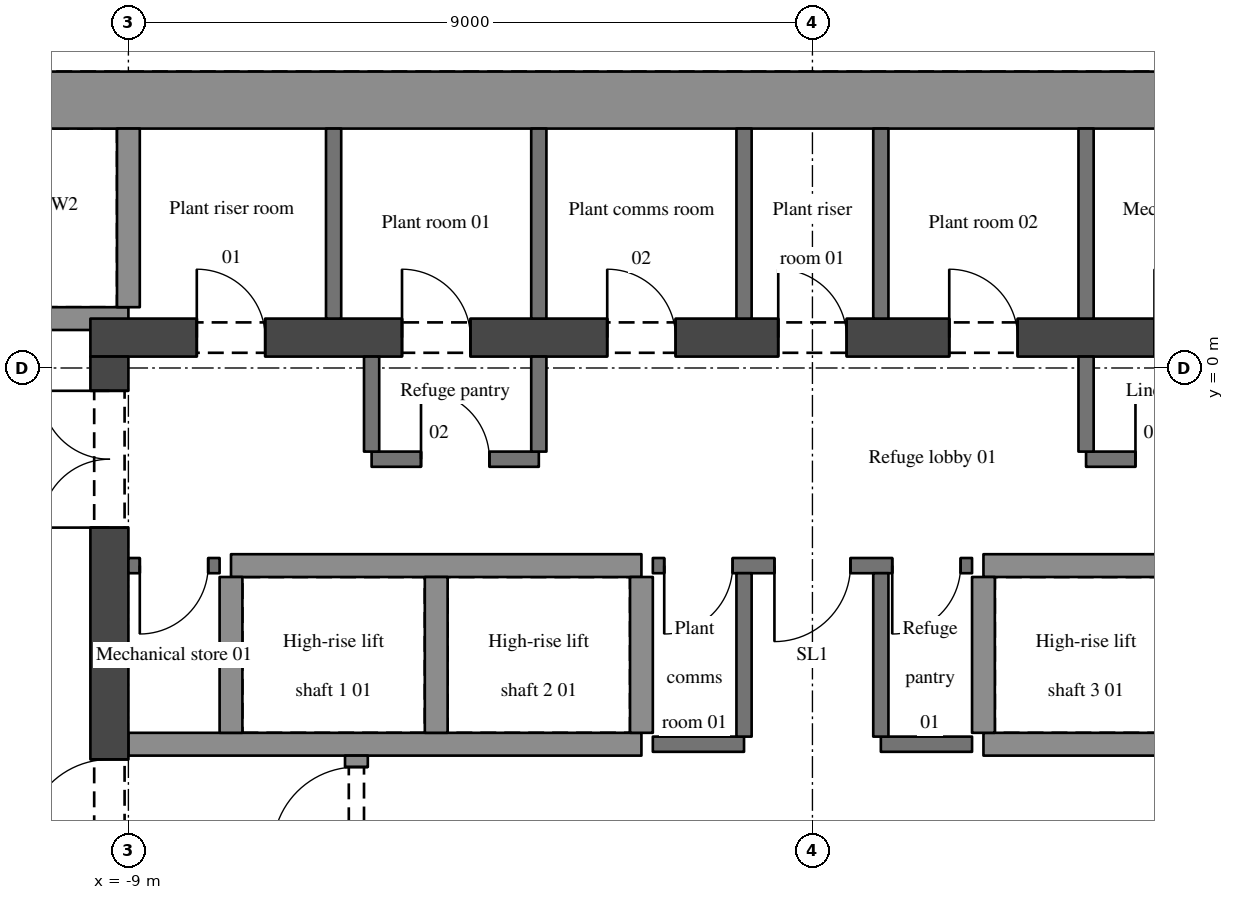
"""IFC4 building model, lengths in metres.
Left out: names, types, materials, properties, quantities, classifications, styles, units other than length and angle.
Written with IfcOpenShell. Run it as: python <this file> out.ifc"""

import sys

from ifc_helpers import new_model, si_unit, direction, frame, frame_2d, origin, place, context, subcontext, project, spatial, rectangle, extrude, element, fill, save


model = new_model("IFC4")
c1 = context("Model", 3, precision=1e-05, world=origin(), true_north=direction((0.0, 1.0)))
c2 = subcontext(c1, "Body", "Model", "MODEL_VIEW")
j1 = project(units=[si_unit("LENGTHUNIT", "METRE"), si_unit("PLANEANGLEUNIT", "RADIAN")], contexts=[c1])
p1 = place(None, origin())
s1 = spatial("IfcSite", under=j1, at=p1, CompositionType="ELEMENT")
p2 = place(p1, origin())
s2 = spatial("IfcBuilding", under=s1, at=p2, CompositionType="ELEMENT")
p3 = place(p2, frame((0.0, 0.0, 167.7)))
s3 = spatial("IfcBuildingStorey", under=s2, at=p3, CompositionType="ELEMENT", Elevation=167.7)
p4 = place(p3, frame((-13.0, 3.525, 0.0), z_axis=(0.0, 0.0, 1.0), x_axis=(1.0, 0.0, 0.0)))
e1 = element("IfcWall", 1, at=p4, inside=s3, PredefinedType="SHEAR", context=c2, shape_type="SweptSolid", body=[
    extrude(rectangle(XDim=26.0, YDim=0.75, at=frame_2d((13.0, 0.0))), origin(), (0.0, 0.0, 1.0), 4.5),
])
p5 = place(p3, frame((-9.5, 0.4, 0.0), z_axis=(0.0, 0.0, 1.0), x_axis=(1.0, 0.0, 0.0)))
e2 = element("IfcWall", 2, at=p5, inside=s3, PredefinedType="SHEAR", context=c2, shape_type="SweptSolid", body=[
    extrude(rectangle(XDim=19.0, YDim=0.5, at=frame_2d((9.5, 0.0))), origin(), (0.0, 0.0, 1.0), 4.5),
])
p6 = place(p5, frame((1.4, 0.0, 0.0)))
e3 = element("IfcOpeningElement", 3, at=p6, cuts=e2, PredefinedType="OPENING", context=c2, shape_type="SweptSolid", body=[
    extrude(rectangle(XDim=0.9, YDim=2.1, at=frame_2d((0.45, 1.05))), frame((0.0, 0.26, 0.0), z_axis=(0.0, -1.0, 0.0), x_axis=(1.0, 0.0, 0.0)), (0.0, 0.0, 1.0), 0.52),
])
p7 = place(p5, frame((4.1, 0.0, 0.0)))
e4 = element("IfcOpeningElement", 4, at=p7, cuts=e2, PredefinedType="OPENING", context=c2, shape_type="SweptSolid", body=[
    extrude(rectangle(XDim=0.9, YDim=2.1, at=frame_2d((0.45, 1.05))), frame((0.0, 0.26, 0.0), z_axis=(0.0, -1.0, 0.0), x_axis=(1.0, 0.0, 0.0)), (0.0, 0.0, 1.0), 0.52),
])
p8 = place(p5, frame((6.8, 0.0, 0.0)))
e5 = element("IfcOpeningElement", 5, at=p8, cuts=e2, PredefinedType="OPENING", context=c2, shape_type="SweptSolid", body=[
    extrude(rectangle(XDim=0.9, YDim=2.1, at=frame_2d((0.45, 1.05))), frame((0.0, 0.26, 0.0), z_axis=(0.0, -1.0, 0.0), x_axis=(1.0, 0.0, 0.0)), (0.0, 0.0, 1.0), 0.52),
])
p9 = place(p5, frame((11.3, 0.0, 0.0)))
e6 = element("IfcOpeningElement", 6, at=p9, cuts=e2, PredefinedType="OPENING", context=c2, shape_type="SweptSolid", body=[
    extrude(rectangle(XDim=0.9, YDim=2.1, at=frame_2d((0.45, 1.05))), frame((0.0, 0.26, 0.0), z_axis=(0.0, -1.0, 0.0), x_axis=(1.0, 0.0, 0.0)), (0.0, 0.0, 1.0), 0.52),
])
p10 = place(p5, frame((14.0, 0.0, 0.0)))
e7 = element("IfcOpeningElement", 7, at=p10, cuts=e2, PredefinedType="OPENING", context=c2, shape_type="SweptSolid", body=[
    extrude(rectangle(XDim=0.9, YDim=2.1, at=frame_2d((0.45, 1.05))), frame((0.0, 0.26, 0.0), z_axis=(0.0, -1.0, 0.0), x_axis=(1.0, 0.0, 0.0)), (0.0, 0.0, 1.0), 0.52),
])
p11 = place(p5, frame((16.7, 0.0, 0.0)))
e8 = element("IfcOpeningElement", 8, at=p11, cuts=e2, PredefinedType="OPENING", context=c2, shape_type="SweptSolid", body=[
    extrude(rectangle(XDim=0.9, YDim=2.1, at=frame_2d((0.45, 1.05))), frame((0.0, 0.26, 0.0), z_axis=(0.0, -1.0, 0.0), x_axis=(1.0, 0.0, 0.0)), (0.0, 0.0, 1.0), 0.52),
])
p12 = place(p5, frame((9.05, 0.0, 0.0)))
e9 = element("IfcOpeningElement", 9, at=p12, cuts=e2, PredefinedType="OPENING", context=c2, shape_type="SweptSolid", body=[
    extrude(rectangle(XDim=0.9, YDim=2.1, at=frame_2d((0.45, 1.05))), frame((0.0, 0.26, 0.0), z_axis=(0.0, -1.0, 0.0), x_axis=(1.0, 0.0, 0.0)), (0.0, 0.0, 1.0), 0.52),
])
p13 = place(p3, frame((-9.25, -11.5, 0.0), z_axis=(0.0, 0.0, 1.0), x_axis=(0.0, 1.0, 0.0)))
e10 = element("IfcWall", 10, at=p13, inside=s3, PredefinedType="SHEAR", context=c2, shape_type="SweptSolid", body=[
    extrude(rectangle(XDim=11.65, YDim=0.5, at=frame_2d((5.825, 0.0))), origin(), (0.0, 0.0, 1.0), 4.5),
])
p14 = place(p13, frame((9.4, 0.0, 0.0)))
e11 = element("IfcOpeningElement", 11, at=p14, cuts=e10, PredefinedType="OPENING", context=c2, shape_type="SweptSolid", body=[
    extrude(rectangle(XDim=1.8, YDim=2.1, at=frame_2d((0.9, 1.05))), frame((0.0, 0.26, 0.0), z_axis=(0.0, -1.0, 0.0), x_axis=(1.0, 0.0, 0.0)), (0.0, 0.0, 1.0), 0.52),
])
p15 = place(p13, frame((5.25, 0.0, 0.0)))
e12 = element("IfcOpeningElement", 12, at=p15, cuts=e10, PredefinedType="OPENING", context=c2, shape_type="SweptSolid", body=[
    extrude(rectangle(XDim=1.1, YDim=2.1, at=frame_2d((0.55, 1.05))), frame((0.0, 0.26, 0.0), z_axis=(0.0, -1.0, 0.0), x_axis=(1.0, 0.0, 0.0)), (0.0, 0.0, 1.0), 0.52),
])
p16 = place(p3, frame((-9.0, -4.95, 0.0), z_axis=(0.0, 0.0, 1.0), x_axis=(1.0, 0.0, 0.0)))
e13 = element("IfcWall", 13, at=p16, inside=s3, PredefinedType="SHEAR", context=c2, shape_type="SweptSolid", body=[
    extrude(rectangle(XDim=6.75, YDim=0.3, at=frame_2d((3.375, 0.0))), origin(), (0.0, 0.0, 1.0), 4.5),
])
for number, where, z_axis, x_axis in (
    (14, (-2.1, -4.95, 0.0), (0.0, 0.0, 1.0), (1.0, 0.0, 0.0)),
    (15, (0.9, -4.95, 0.0), (0.0, 0.0, 1.0), (1.0, 0.0, 0.0)),
):
    element("IfcWall", number, at=place(p3, frame(where, z_axis=z_axis, x_axis=x_axis)), inside=s3, PredefinedType="SOLIDWALL", context=c2, shape_type="SweptSolid", body=[
        extrude(rectangle(XDim=1.2, YDim=0.2, at=frame_2d((0.6, 0.0))), origin(), (0.0, 0.0, 1.0), 4.2),
    ])
p17 = place(p3, frame((2.25, -4.95, 0.0), z_axis=(0.0, 0.0, 1.0), x_axis=(1.0, 0.0, 0.0)))
e16 = element("IfcWall", 16, at=p17, inside=s3, PredefinedType="SHEAR", context=c2, shape_type="SweptSolid", body=[
    extrude(rectangle(XDim=6.75, YDim=0.3, at=frame_2d((3.375, 0.0))), origin(), (0.0, 0.0, 1.0), 4.5),
])
p18 = place(p3, frame((-7.8, -2.6, 0.0), z_axis=(0.0, 0.0, 1.0), x_axis=(-1.0, 0.0, 0.0)))
e17 = element("IfcWall", 17, at=p18, inside=s3, PredefinedType="SOLIDWALL", context=c2, shape_type="SweptSolid", body=[
    extrude(rectangle(XDim=1.2, YDim=0.2, at=frame_2d((0.6, 0.0))), origin(), (0.0, 0.0, 1.0), 4.2),
])
p19 = place(p18, frame((0.15, 0.0, 0.0)))
e18 = element("IfcOpeningElement", 18, at=p19, cuts=e17, PredefinedType="OPENING", context=c2, shape_type="SweptSolid", body=[
    extrude(rectangle(XDim=0.9, YDim=2.1, at=frame_2d((0.45, 1.05))), frame((0.0, 0.11, 0.0), z_axis=(0.0, -1.0, 0.0), x_axis=(1.0, 0.0, 0.0)), (0.0, 0.0, 1.0), 0.22),
])
p20 = place(p3, frame((-7.65, -2.6, 0.0), z_axis=(0.0, 0.0, 1.0), x_axis=(1.0, 0.0, 0.0)))
e19 = element("IfcWall", 19, at=p20, inside=s3, PredefinedType="SHEAR", context=c2, shape_type="SweptSolid", body=[
    extrude(rectangle(XDim=5.4, YDim=0.3, at=frame_2d((2.7, 0.0))), origin(), (0.0, 0.0, 1.0), 4.5),
])
p21 = place(p3, frame((2.1, -2.6, 0.0), z_axis=(0.0, 0.0, 1.0), x_axis=(-1.0, 0.0, 0.0)))
e20 = element("IfcWall", 20, at=p21, inside=s3, PredefinedType="SOLIDWALL", context=c2, shape_type="SweptSolid", body=[
    extrude(rectangle(XDim=4.2, YDim=0.2, at=frame_2d((2.1, 0.0))), origin(), (0.0, 0.0, 1.0), 4.2),
])
p22 = place(p21, frame((1.6, 0.0, 0.0)))
e21 = element("IfcOpeningElement", 21, at=p22, cuts=e20, PredefinedType="OPENING", context=c2, shape_type="SweptSolid", body=[
    extrude(rectangle(XDim=1.0, YDim=2.1, at=frame_2d((0.5, 1.05))), frame((0.0, 0.11, 0.0), z_axis=(0.0, -1.0, 0.0), x_axis=(1.0, 0.0, 0.0)), (0.0, 0.0, 1.0), 0.22),
])
p23 = place(p21, frame((3.15, 0.0, 0.0)))
e22 = element("IfcOpeningElement", 22, at=p23, cuts=e20, PredefinedType="OPENING", context=c2, shape_type="SweptSolid", body=[
    extrude(rectangle(XDim=0.9, YDim=2.1, at=frame_2d((0.45, 1.05))), frame((0.0, 0.11, 0.0), z_axis=(0.0, -1.0, 0.0), x_axis=(1.0, 0.0, 0.0)), (0.0, 0.0, 1.0), 0.22),
])
p24 = place(p21, frame((0.15, 0.0, 0.0)))
e23 = element("IfcOpeningElement", 23, at=p24, cuts=e20, PredefinedType="OPENING", context=c2, shape_type="SweptSolid", body=[
    extrude(rectangle(XDim=0.9, YDim=2.1, at=frame_2d((0.45, 1.05))), frame((0.0, 0.11, 0.0), z_axis=(0.0, -1.0, 0.0), x_axis=(1.0, 0.0, 0.0)), (0.0, 0.0, 1.0), 0.22),
])
p25 = place(p3, frame((2.25, -2.6, 0.0), z_axis=(0.0, 0.0, 1.0), x_axis=(1.0, 0.0, 0.0)))
e24 = element("IfcWall", 24, at=p25, inside=s3, PredefinedType="SHEAR", context=c2, shape_type="SweptSolid", body=[
    extrude(rectangle(XDim=5.4, YDim=0.3, at=frame_2d((2.7, 0.0))), origin(), (0.0, 0.0, 1.0), 4.5),
])
p26 = place(p3, frame((-5.8, -1.2, 0.0), z_axis=(0.0, 0.0, 1.0), x_axis=(1.0, 0.0, 0.0)))
e25 = element("IfcWall", 25, at=p26, inside=s3, PredefinedType="SOLIDWALL", context=c2, shape_type="SweptSolid", body=[
    extrude(rectangle(XDim=2.2, YDim=0.2, at=frame_2d((1.1, 0.0))), origin(), (0.0, 0.0, 1.0), 4.2),
])
p27 = place(p26, frame((0.65, 0.0, 0.0)))
e26 = element("IfcOpeningElement", 26, at=p27, cuts=e25, PredefinedType="OPENING", context=c2, shape_type="SweptSolid", body=[
    extrude(rectangle(XDim=0.9, YDim=2.1, at=frame_2d((0.45, 1.05))), frame((0.0, 0.11, 0.0), z_axis=(0.0, -1.0, 0.0), x_axis=(1.0, 0.0, 0.0)), (0.0, 0.0, 1.0), 0.22),
])
p28 = place(p3, frame((3.6, -1.2, 0.0), z_axis=(0.0, 0.0, 1.0), x_axis=(1.0, 0.0, 0.0)))
e27 = element("IfcWall", 27, at=p28, inside=s3, PredefinedType="SOLIDWALL", context=c2, shape_type="SweptSolid", body=[
    extrude(rectangle(XDim=2.2, YDim=0.2, at=frame_2d((1.1, 0.0))), origin(), (0.0, 0.0, 1.0), 4.2),
])
p29 = place(p28, frame((0.65, 0.0, 0.0)))
e28 = element("IfcOpeningElement", 28, at=p29, cuts=e27, PredefinedType="OPENING", context=c2, shape_type="SweptSolid", body=[
    extrude(rectangle(XDim=0.9, YDim=2.1, at=frame_2d((0.45, 1.05))), frame((0.0, 0.11, 0.0), z_axis=(0.0, -1.0, 0.0), x_axis=(1.0, 0.0, 0.0)), (0.0, 0.0, 1.0), 0.22),
])
p30 = place(p3, frame((-9.0, 0.65, 0.0), z_axis=(0.0, 0.0, 1.0), x_axis=(-1.0, 0.0, 0.0)))
e29 = element("IfcWall", 29, at=p30, inside=s3, PredefinedType="SHEAR", context=c2, shape_type="SweptSolid", body=[
    extrude(rectangle(XDim=3.25, YDim=0.3, at=frame_2d((1.625, 0.0))), origin(), (0.0, 0.0, 1.0), 4.5),
])
p31 = place(p3, frame((-9.0, 0.8, 0.0), z_axis=(0.0, 0.0, 1.0), x_axis=(0.0, 1.0, 0.0)))
e30 = element("IfcWall", 30, at=p31, inside=s3, PredefinedType="SHEAR", context=c2, shape_type="SweptSolid", body=[
    extrude(rectangle(XDim=2.35, YDim=0.3, at=frame_2d((1.175, 0.0))), origin(), (0.0, 0.0, 1.0), 4.5),
])
p32 = place(p3, frame((-7.65, -4.8, 0.0), z_axis=(0.0, 0.0, 1.0), x_axis=(0.0, 1.0, 0.0)))
e31 = element("IfcWall", 31, at=p32, inside=s3, PredefinedType="SHEAR", context=c2, shape_type="SweptSolid", body=[
    extrude(rectangle(XDim=2.05, YDim=0.3, at=frame_2d((1.025, 0.0))), origin(), (0.0, 0.0, 1.0), 4.5),
])
p33 = place(p3, frame((-6.3, 0.65, 0.0), z_axis=(0.0, 0.0, 1.0), x_axis=(0.0, 1.0, 0.0)))
e32 = element("IfcWall", 32, at=p33, inside=s3, PredefinedType="SOLIDWALL", context=c2, shape_type="SweptSolid", body=[
    extrude(rectangle(XDim=2.5, YDim=0.2, at=frame_2d((1.25, 0.0))), origin(), (0.0, 0.0, 1.0), 4.2),
])
p34 = place(p3, frame((-6.0, -11.5, 0.0), z_axis=(0.0, 0.0, 1.0), x_axis=(0.0, 1.0, 0.0)))
e33 = element("IfcWall", 33, at=p34, inside=s3, PredefinedType="SHEAR", context=c2, shape_type="SweptSolid", body=[
    extrude(rectangle(XDim=6.4, YDim=0.3, at=frame_2d((3.2, 0.0))), origin(), (0.0, 0.0, 1.0), 4.5),
])
p35 = place(p34, frame((5.15, 0.0, 0.0)))
e34 = element("IfcOpeningElement", 34, at=p35, cuts=e33, PredefinedType="OPENING", context=c2, shape_type="SweptSolid", body=[
    extrude(rectangle(XDim=1.1, YDim=2.1, at=frame_2d((0.55, 1.05))), frame((0.0, 0.16, 0.0), z_axis=(0.0, -1.0, 0.0), x_axis=(1.0, 0.0, 0.0)), (0.0, 0.0, 1.0), 0.32),
])
p36 = place(p3, frame((-5.8, -1.1, 0.0), z_axis=(0.0, 0.0, 1.0), x_axis=(0.0, 1.0, 0.0)))
e35 = element("IfcWall", 35, at=p36, inside=s3, PredefinedType="SOLIDWALL", context=c2, shape_type="SweptSolid", body=[
    extrude(rectangle(XDim=1.25, YDim=0.2, at=frame_2d((0.625, 0.0))), origin(), (0.0, 0.0, 1.0), 4.2),
])
p37 = place(p3, frame((-4.95, -4.8, 0.0), z_axis=(0.0, 0.0, 1.0), x_axis=(0.0, 1.0, 0.0)))
e36 = element("IfcWall", 36, at=p37, inside=s3, PredefinedType="SHEAR", context=c2, shape_type="SweptSolid", body=[
    extrude(rectangle(XDim=2.05, YDim=0.3, at=frame_2d((1.025, 0.0))), origin(), (0.0, 0.0, 1.0), 4.5),
])
p38 = place(p3, frame((-3.6, -1.1, 0.0), z_axis=(0.0, 0.0, 1.0), x_axis=(0.0, 1.0, 0.0)))
e37 = element("IfcWall", 37, at=p38, inside=s3, PredefinedType="SOLIDWALL", context=c2, shape_type="SweptSolid", body=[
    extrude(rectangle(XDim=1.25, YDim=0.2, at=frame_2d((0.625, 0.0))), origin(), (0.0, 0.0, 1.0), 4.2),
])
p39 = place(p3, frame((-3.6, 0.65, 0.0), z_axis=(0.0, 0.0, 1.0), x_axis=(0.0, 1.0, 0.0)))
e38 = element("IfcWall", 38, at=p39, inside=s3, PredefinedType="SOLIDWALL", context=c2, shape_type="SweptSolid", body=[
    extrude(rectangle(XDim=2.5, YDim=0.2, at=frame_2d((1.25, 0.0))), origin(), (0.0, 0.0, 1.0), 4.2),
])
p40 = place(p3, frame((-2.25, -4.8, 0.0), z_axis=(0.0, 0.0, 1.0), x_axis=(0.0, 1.0, 0.0)))
e39 = element("IfcWall", 39, at=p40, inside=s3, PredefinedType="SHEAR", context=c2, shape_type="SweptSolid", body=[
    extrude(rectangle(XDim=2.05, YDim=0.3, at=frame_2d((1.025, 0.0))), origin(), (0.0, 0.0, 1.0), 4.5),
])
p41 = place(p3, frame((-0.9, -4.85, 0.0), z_axis=(0.0, 0.0, 1.0), x_axis=(0.0, 1.0, 0.0)))
e40 = element("IfcWall", 40, at=p41, inside=s3, PredefinedType="SOLIDWALL", context=c2, shape_type="SweptSolid", body=[
    extrude(rectangle(XDim=2.15, YDim=0.2, at=frame_2d((1.075, 0.0))), origin(), (0.0, 0.0, 1.0), 4.2),
])
p42 = place(p3, frame((-0.9, 0.65, 0.0), z_axis=(0.0, 0.0, 1.0), x_axis=(0.0, 1.0, 0.0)))
e41 = element("IfcWall", 41, at=p42, inside=s3, PredefinedType="SOLIDWALL", context=c2, shape_type="SweptSolid", body=[
    extrude(rectangle(XDim=2.5, YDim=0.2, at=frame_2d((1.25, 0.0))), origin(), (0.0, 0.0, 1.0), 4.2),
])
p43 = place(p3, frame((0.9, -4.85, 0.0), z_axis=(0.0, 0.0, 1.0), x_axis=(0.0, 1.0, 0.0)))
e42 = element("IfcWall", 42, at=p43, inside=s3, PredefinedType="SOLIDWALL", context=c2, shape_type="SweptSolid", body=[
    extrude(rectangle(XDim=2.15, YDim=0.2, at=frame_2d((1.075, 0.0))), origin(), (0.0, 0.0, 1.0), 4.2),
])
p44 = place(p3, frame((0.9, 0.65, 0.0), z_axis=(0.0, 0.0, 1.0), x_axis=(0.0, 1.0, 0.0)))
e43 = element("IfcWall", 43, at=p44, inside=s3, PredefinedType="SOLIDWALL", context=c2, shape_type="SweptSolid", body=[
    extrude(rectangle(XDim=2.5, YDim=0.2, at=frame_2d((1.25, 0.0))), origin(), (0.0, 0.0, 1.0), 4.2),
])
p45 = place(p3, frame((2.25, -4.8, 0.0), z_axis=(0.0, 0.0, 1.0), x_axis=(0.0, 1.0, 0.0)))
e44 = element("IfcWall", 44, at=p45, inside=s3, PredefinedType="SHEAR", context=c2, shape_type="SweptSolid", body=[
    extrude(rectangle(XDim=2.05, YDim=0.3, at=frame_2d((1.025, 0.0))), origin(), (0.0, 0.0, 1.0), 4.5),
])
p46 = place(p3, frame((3.6, -1.1, 0.0), z_axis=(0.0, 0.0, 1.0), x_axis=(0.0, 1.0, 0.0)))
e45 = element("IfcWall", 45, at=p46, inside=s3, PredefinedType="SOLIDWALL", context=c2, shape_type="SweptSolid", body=[
    extrude(rectangle(XDim=1.25, YDim=0.2, at=frame_2d((0.625, 0.0))), origin(), (0.0, 0.0, 1.0), 4.2),
])
p47 = place(p3, frame((3.6, 0.65, 0.0), z_axis=(0.0, 0.0, 1.0), x_axis=(0.0, 1.0, 0.0)))
e46 = element("IfcWall", 46, at=p47, inside=s3, PredefinedType="SOLIDWALL", context=c2, shape_type="SweptSolid", body=[
    extrude(rectangle(XDim=2.5, YDim=0.2, at=frame_2d((1.25, 0.0))), origin(), (0.0, 0.0, 1.0), 4.2),
])
p48 = place(p14, origin())
e47 = element("IfcDoor", 47, at=p48, inside=s3, OperationType="DOUBLE_DOOR_SINGLE_SWING", PredefinedType="DOOR", context=c2, shape_type="SweptSolid", body=[
    extrude(rectangle(XDim=1.8, YDim=2.1, at=frame_2d((0.9, 1.05))), frame((0.0, 0.025, 0.0), z_axis=(0.0, -1.0, 0.0), x_axis=(1.0, 0.0, 0.0)), (0.0, 0.0, 1.0), 0.05),
])
fill(e11, e47)
p49 = place(p22, origin())
e48 = element("IfcDoor", 48, at=p49, inside=s3, OperationType="SINGLE_SWING_RIGHT", PredefinedType="DOOR", context=c2, shape_type="SweptSolid", body=[
    extrude(rectangle(XDim=1.0, YDim=2.1, at=frame_2d((0.5, 1.05))), frame((0.0, 0.025, 0.0), z_axis=(0.0, -1.0, 0.0), x_axis=(1.0, 0.0, 0.0)), (0.0, 0.0, 1.0), 0.05),
])
fill(e21, e48)
p50 = place(p35, origin())
e49 = element("IfcDoor", 49, at=p50, inside=s3, OperationType="SINGLE_SWING_LEFT", PredefinedType="DOOR", context=c2, shape_type="SweptSolid", body=[
    extrude(rectangle(XDim=1.1, YDim=2.1, at=frame_2d((0.55, 1.05))), frame((0.0, 0.025, 0.0), z_axis=(0.0, -1.0, 0.0), x_axis=(1.0, 0.0, 0.0)), (0.0, 0.0, 1.0), 0.05),
])
fill(e34, e49)
p51 = place(p15, origin())
e50 = element("IfcDoor", 50, at=p51, inside=s3, OperationType="SINGLE_SWING_LEFT", PredefinedType="DOOR", context=c2, shape_type="SweptSolid", body=[
    extrude(rectangle(XDim=1.1, YDim=2.1, at=frame_2d((0.55, 1.05))), frame((0.0, 0.025, 0.0), z_axis=(0.0, -1.0, 0.0), x_axis=(1.0, 0.0, 0.0)), (0.0, 0.0, 1.0), 0.05),
])
fill(e12, e50)
p52 = place(p23, origin())
e51 = element("IfcDoor", 51, at=p52, inside=s3, OperationType="SINGLE_SWING_RIGHT", PredefinedType="DOOR", context=c2, shape_type="SweptSolid", body=[
    extrude(rectangle(XDim=0.9, YDim=2.1, at=frame_2d((0.45, 1.05))), frame((0.0, 0.025, 0.0), z_axis=(0.0, -1.0, 0.0), x_axis=(1.0, 0.0, 0.0)), (0.0, 0.0, 1.0), 0.05),
])
fill(e22, e51)
p53 = place(p24, origin())
e52 = element("IfcDoor", 52, at=p53, inside=s3, OperationType="SINGLE_SWING_RIGHT", PredefinedType="DOOR", context=c2, shape_type="SweptSolid", body=[
    extrude(rectangle(XDim=0.9, YDim=2.1, at=frame_2d((0.45, 1.05))), frame((0.0, 0.025, 0.0), z_axis=(0.0, -1.0, 0.0), x_axis=(1.0, 0.0, 0.0)), (0.0, 0.0, 1.0), 0.05),
])
fill(e23, e52)
p54 = place(p19, origin())
e53 = element("IfcDoor", 53, at=p54, inside=s3, OperationType="SINGLE_SWING_RIGHT", PredefinedType="DOOR", context=c2, shape_type="SweptSolid", body=[
    extrude(rectangle(XDim=0.9, YDim=2.1, at=frame_2d((0.45, 1.05))), frame((0.0, 0.025, 0.0), z_axis=(0.0, -1.0, 0.0), x_axis=(1.0, 0.0, 0.0)), (0.0, 0.0, 1.0), 0.05),
])
fill(e18, e53)
p55 = place(p6, origin())
e54 = element("IfcDoor", 54, at=p55, inside=s3, OperationType="SINGLE_SWING_LEFT", PredefinedType="DOOR", context=c2, shape_type="SweptSolid", body=[
    extrude(rectangle(XDim=0.9, YDim=2.1, at=frame_2d((0.45, 1.05))), frame((0.0, 0.025, 0.0), z_axis=(0.0, -1.0, 0.0), x_axis=(1.0, 0.0, 0.0)), (0.0, 0.0, 1.0), 0.05),
])
fill(e3, e54)
p56 = place(p7, origin())
e55 = element("IfcDoor", 55, at=p56, inside=s3, OperationType="SINGLE_SWING_LEFT", PredefinedType="DOOR", context=c2, shape_type="SweptSolid", body=[
    extrude(rectangle(XDim=0.9, YDim=2.1, at=frame_2d((0.45, 1.05))), frame((0.0, 0.025, 0.0), z_axis=(0.0, -1.0, 0.0), x_axis=(1.0, 0.0, 0.0)), (0.0, 0.0, 1.0), 0.05),
])
fill(e4, e55)
p57 = place(p8, origin())
e56 = element("IfcDoor", 56, at=p57, inside=s3, OperationType="SINGLE_SWING_LEFT", PredefinedType="DOOR", context=c2, shape_type="SweptSolid", body=[
    extrude(rectangle(XDim=0.9, YDim=2.1, at=frame_2d((0.45, 1.05))), frame((0.0, 0.025, 0.0), z_axis=(0.0, -1.0, 0.0), x_axis=(1.0, 0.0, 0.0)), (0.0, 0.0, 1.0), 0.05),
])
fill(e5, e56)
p58 = place(p9, origin())
e57 = element("IfcDoor", 57, at=p58, inside=s3, OperationType="SINGLE_SWING_LEFT", PredefinedType="DOOR", context=c2, shape_type="SweptSolid", body=[
    extrude(rectangle(XDim=0.9, YDim=2.1, at=frame_2d((0.45, 1.05))), frame((0.0, 0.025, 0.0), z_axis=(0.0, -1.0, 0.0), x_axis=(1.0, 0.0, 0.0)), (0.0, 0.0, 1.0), 0.05),
])
fill(e6, e57)
p59 = place(p12, origin())
e58 = element("IfcDoor", 58, at=p59, inside=s3, OperationType="SINGLE_SWING_LEFT", PredefinedType="DOOR", context=c2, shape_type="SweptSolid", body=[
    extrude(rectangle(XDim=0.9, YDim=2.1, at=frame_2d((0.45, 1.05))), frame((0.0, 0.025, 0.0), z_axis=(0.0, -1.0, 0.0), x_axis=(1.0, 0.0, 0.0)), (0.0, 0.0, 1.0), 0.05),
])
fill(e9, e58)
p60 = place(p27, origin())
e59 = element("IfcDoor", 59, at=p60, inside=s3, OperationType="SINGLE_SWING_LEFT", PredefinedType="DOOR", context=c2, shape_type="SweptSolid", body=[
    extrude(rectangle(XDim=0.9, YDim=2.1, at=frame_2d((0.45, 1.05))), frame((0.0, 0.025, 0.0), z_axis=(0.0, -1.0, 0.0), x_axis=(1.0, 0.0, 0.0)), (0.0, 0.0, 1.0), 0.05),
])
fill(e26, e59)
p61 = place(p29, origin())
e60 = element("IfcDoor", 60, at=p61, inside=s3, OperationType="SINGLE_SWING_LEFT", PredefinedType="DOOR", context=c2, shape_type="SweptSolid", body=[
    extrude(rectangle(XDim=0.9, YDim=2.1, at=frame_2d((0.45, 1.05))), frame((0.0, 0.025, 0.0), z_axis=(0.0, -1.0, 0.0), x_axis=(1.0, 0.0, 0.0)), (0.0, 0.0, 1.0), 0.05),
])
fill(e28, e60)
save(model, sys.argv[1])
